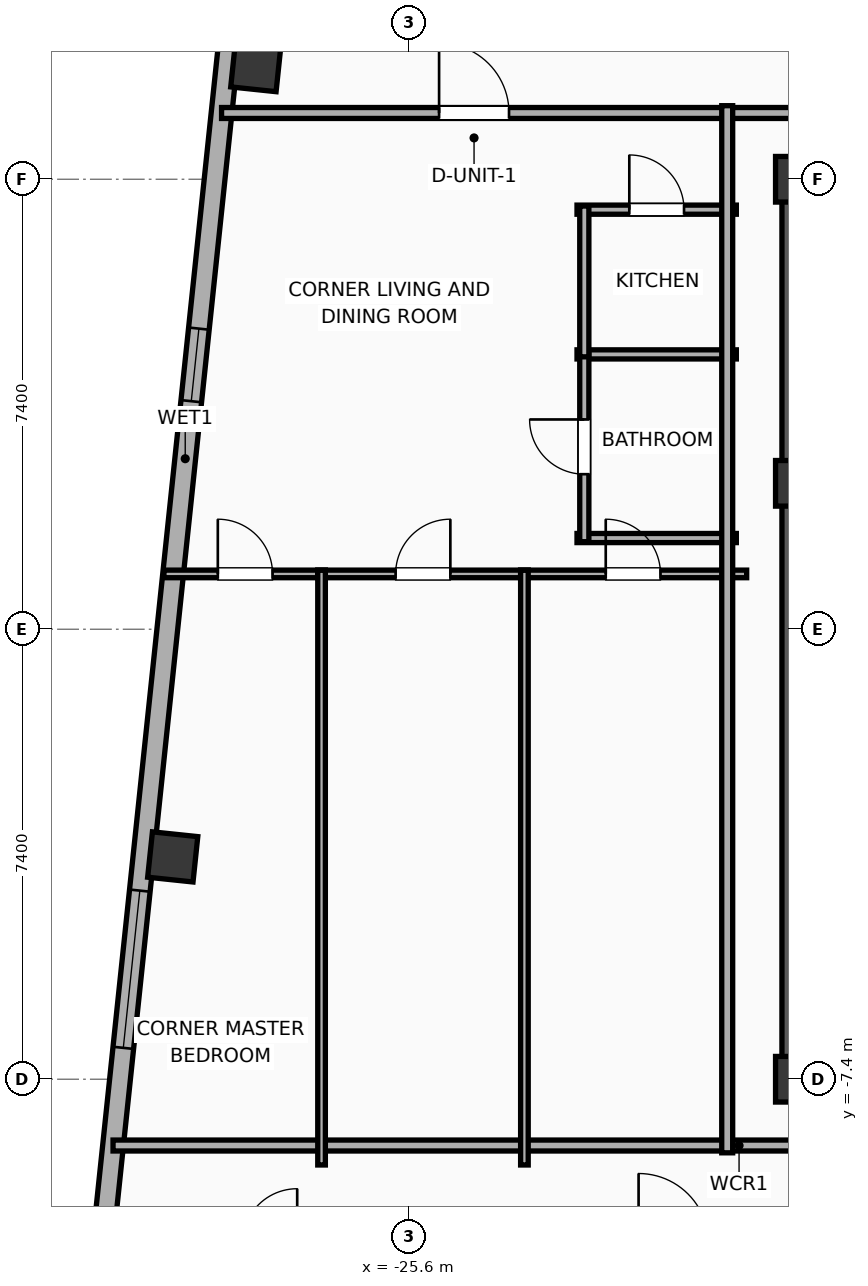
"""IFC4 building model, lengths in metres.
Left out: names, types, materials, properties, quantities, classifications, styles, units other than length and angle.
Written with IfcOpenShell. Run it as: python <this file> out.ifc"""

import sys

from ifc_helpers import new_model, si_unit, direction, frame, frame_2d, origin, origin_2d, place, context, subcontext, project, spatial, rectangle, hollow_rectangle, extrude, element, fill, save


model = new_model("IFC4")
c1 = context("Model", 3, precision=1e-05, world=origin(), true_north=direction((0.0, 1.0)))
c2 = subcontext(c1, "Body", "Model", "MODEL_VIEW")
j1 = project(units=[si_unit("LENGTHUNIT", "METRE"), si_unit("PLANEANGLEUNIT", "RADIAN")], contexts=[c1])
p1 = place(None, origin())
s1 = spatial("IfcSite", under=j1, at=p1, CompositionType="ELEMENT")
p2 = place(p1, origin())
s2 = spatial("IfcBuilding", under=s1, at=p2, CompositionType="ELEMENT")
p3 = place(p2, frame((0.0, 0.0, 299.0)))
s3 = spatial("IfcBuildingStorey", under=s2, at=p3, CompositionType="ELEMENT", Elevation=299.0)
for number, where, z_axis, x_axis in (
    (1, (-19.2, -7.4, 0.0), (0.0, 0.0, 1.0), (1.0, 0.0, 0.0)),
    (2, (-19.2, 2.4, 0.0), (0.0, 0.0, 1.0), (1.0, 0.0, 0.0)),
    (3, (-19.2, 7.4, 0.0), (0.0, 0.0, 1.0), (1.0, 0.0, 0.0)),
):
    element("IfcColumn", number, at=place(p3, frame(where, z_axis=z_axis, x_axis=x_axis)), inside=s3, PredefinedType="COLUMN", context=c2, shape_type="SweptSolid", body=[
        extrude(rectangle(XDim=0.75, YDim=0.75, at=origin_2d()), origin(), (0.0, 0.0, 1.0), 3.9),
    ])
for number, where, z_axis, x_axis in (
    (4, (-19.425, -7.4, 0.0), (0.0, 0.0, 1.0), (1.0, 0.0, 0.0)),
    (5, (-19.425, 7.4, 0.0), (0.0, 0.0, 1.0), (1.0, 0.0, 0.0)),
):
    element("IfcWall", number, at=place(p3, frame(where, z_axis=z_axis, x_axis=x_axis)), inside=s3, PredefinedType="SHEAR", context=c2, shape_type="SweptSolid", body=[
        extrude(rectangle(XDim=7.25, YDim=0.45, at=frame_2d((3.625, 0.0))), origin(), (0.0, 0.0, 1.0), 3.635),
    ])
p4 = place(p3, frame((-19.145, -7.4, 0.0), z_axis=(0.0, 0.0, 1.0), x_axis=(0.0, 1.0, 0.0)))
e6 = element("IfcWall", 6, at=p4, inside=s3, PredefinedType="SHEAR", context=c2, shape_type="SweptSolid", body=[
    extrude(rectangle(XDim=14.8, YDim=0.65, at=frame_2d((7.4, 0.0))), origin(), (0.0, 0.0, 1.0), 3.635),
])
for number, where, z_axis, x_axis in (
    (7, (-28.123, 9.252, 0.0), (0.0, 0.0, 1.0), (0.995, -0.105, 0.0)),
    (8, (-29.489, -3.744, 0.0), (0.0, 0.0, 1.0), (0.995, -0.105, 0.0)),
):
    element("IfcColumn", number, at=place(p3, frame(where, z_axis=z_axis, x_axis=x_axis)), inside=s3, PredefinedType="COLUMN", context=c2, shape_type="SweptSolid", body=[
        extrude(hollow_rectangle(XDim=0.75, YDim=0.75, WallThickness=0.025, at=origin_2d()), origin(), (0.0, 0.0, 1.0), 3.9),
    ])
p5 = place(p3, frame((-30.87, -12.296, 0.0), z_axis=(0.0, 0.0, 1.0), x_axis=(0.104533282919, 0.994521388791, 0.0)))
e9 = element("IfcWall", 9, at=p5, inside=s3, PredefinedType="ELEMENTEDWALL", context=c2, shape_type="SweptSolid", body=[
    extrude(rectangle(XDim=30.366, YDim=0.34, at=frame_2d((15.183, 0.0))), origin(), (0.0, 0.0, 1.0), 3.635),
])
p6 = place(p5, frame((5.442, 0.0, 0.65)))
e10 = element("IfcOpeningElement", 10, at=p6, cuts=e9, PredefinedType="OPENING", context=c2, shape_type="SweptSolid", body=[
    extrude(rectangle(XDim=2.6, YDim=2.45, at=frame_2d((1.3, 1.225))), frame((0.0, 0.18, 0.0), z_axis=(0.0, -1.0, 0.0), x_axis=(1.0, 0.0, 0.0)), (0.0, 0.0, 1.0), 0.36),
])
p7 = place(p5, frame((27.017, 0.0, 0.75)))
e11 = element("IfcOpeningElement", 11, at=p7, cuts=e9, PredefinedType="OPENING", context=c2, shape_type="SweptSolid", body=[
    extrude(rectangle(XDim=1.2, YDim=2.05, at=frame_2d((0.6, 1.025))), frame((0.0, 0.18, 0.0), z_axis=(0.0, -1.0, 0.0), x_axis=(1.0, 0.0, 0.0)), (0.0, 0.0, 1.0), 0.36),
])
p8 = place(p5, frame((16.135, 0.0, 0.75)))
e12 = element("IfcOpeningElement", 12, at=p8, cuts=e9, PredefinedType="OPENING", context=c2, shape_type="SweptSolid", body=[
    extrude(rectangle(XDim=1.2, YDim=2.05, at=frame_2d((0.6, 1.025))), frame((0.0, 0.18, 0.0), z_axis=(0.0, -1.0, 0.0), x_axis=(1.0, 0.0, 0.0)), (0.0, 0.0, 1.0), 0.36),
])
p9 = place(p3, frame((-28.686, 8.49, 0.0), z_axis=(0.0, 0.0, 1.0), x_axis=(1.0, 0.0, 0.0)))
e13 = element("IfcWall", 13, at=p9, inside=s3, PredefinedType="PARTITIONING", context=c2, shape_type="SweptSolid", body=[
    extrude(rectangle(XDim=18.806, YDim=0.18, at=frame_2d((9.403, 0.0))), origin(), (0.0, 0.0, 1.0), 3.075),
])
p10 = place(p9, frame((3.577, 0.0, 0.0)))
e14 = element("IfcOpeningElement", 14, at=p10, cuts=e13, PredefinedType="OPENING", context=c2, shape_type="SweptSolid", body=[
    extrude(rectangle(XDim=1.15, YDim=2.05, at=frame_2d((0.575, 1.025))), frame((0.0, 0.1, 0.0), z_axis=(0.0, -1.0, 0.0), x_axis=(1.0, 0.0, 0.0)), (0.0, 0.0, 1.0), 0.2),
])
p11 = place(p3, frame((-30.47, -8.49, 0.0), z_axis=(0.0, 0.0, 1.0), x_axis=(1.0, 0.0, 0.0)))
e15 = element("IfcWall", 15, at=p11, inside=s3, PredefinedType="PARTITIONING", context=c2, shape_type="SweptSolid", body=[
    extrude(rectangle(XDim=20.59, YDim=0.18, at=frame_2d((10.295, 0.0))), origin(), (0.0, 0.0, 1.0), 3.635),
])
p12 = place(p3, frame((-22.84, 6.9, 0.0), z_axis=(0.0, 0.0, 1.0), x_axis=(1.0, 0.0, 0.0)))
e16 = element("IfcWall", 16, at=p12, inside=s3, PredefinedType="PLUMBINGWALL", context=c2, shape_type="SweptSolid", body=[
    extrude(rectangle(XDim=2.62, YDim=0.15, at=frame_2d((1.31, 0.0))), origin(), (0.0, 0.0, 1.0), 3.635),
])
p13 = place(p12, frame((0.86, 0.0, 0.0)))
e17 = element("IfcOpeningElement", 17, at=p13, cuts=e16, PredefinedType="OPENING", context=c2, shape_type="SweptSolid", body=[
    extrude(rectangle(XDim=0.9, YDim=2.05, at=frame_2d((0.45, 1.025))), frame((0.0, 0.085, 0.0), z_axis=(0.0, -1.0, 0.0), x_axis=(1.0, 0.0, 0.0)), (0.0, 0.0, 1.0), 0.17),
])
for number, where, z_axis, x_axis in (
    (18, (-22.84, 4.52, 0.0), (0.0, 0.0, 1.0), (1.0, 0.0, 0.0)),
    (19, (-22.84, 1.5, 0.0), (0.0, 0.0, 1.0), (1.0, 0.0, 0.0)),
):
    element("IfcWall", number, at=place(p3, frame(where, z_axis=z_axis, x_axis=x_axis)), inside=s3, PredefinedType="PLUMBINGWALL", context=c2, shape_type="SweptSolid", body=[
        extrude(rectangle(XDim=2.62, YDim=0.15, at=frame_2d((1.31, 0.0))), origin(), (0.0, 0.0, 1.0), 3.635),
    ])
p14 = place(p3, frame((-22.72, 1.44, 0.0), z_axis=(0.0, 0.0, 1.0), x_axis=(0.0, 1.0, 0.0)))
e20 = element("IfcWall", 20, at=p14, inside=s3, PredefinedType="PLUMBINGWALL", context=c2, shape_type="SweptSolid", body=[
    extrude(rectangle(XDim=3.12, YDim=0.15, at=frame_2d((1.56, 0.0))), origin(), (0.0, 0.0, 1.0), 3.635),
])
p15 = place(p14, frame((1.11, 0.0, 0.0)))
e21 = element("IfcOpeningElement", 21, at=p15, cuts=e20, PredefinedType="OPENING", context=c2, shape_type="SweptSolid", body=[
    extrude(rectangle(XDim=0.9, YDim=2.05, at=frame_2d((0.45, 1.025))), frame((0.0, 0.085, 0.0), z_axis=(0.0, -1.0, 0.0), x_axis=(1.0, 0.0, 0.0)), (0.0, 0.0, 1.0), 0.17),
])
p16 = place(p3, frame((-22.72, 4.48, 0.0), z_axis=(0.0, 0.0, 1.0), x_axis=(0.0, 1.0, 0.0)))
e22 = element("IfcWall", 22, at=p16, inside=s3, PredefinedType="PLUMBINGWALL", context=c2, shape_type="SweptSolid", body=[
    extrude(rectangle(XDim=2.48, YDim=0.15, at=frame_2d((1.24, 0.0))), origin(), (0.0, 0.0, 1.0), 3.635),
])
p17 = place(p3, frame((-29.633, 0.91, 0.0), z_axis=(0.0, 0.0, 1.0), x_axis=(1.0, 0.0, 0.0)))
e23 = element("IfcWall", 23, at=p17, inside=s3, PredefinedType="PARTITIONING", context=c2, shape_type="SweptSolid", body=[
    extrude(rectangle(XDim=2.655, YDim=0.125, at=frame_2d((1.327, 0.0))), origin(), (0.0, 0.0, 1.0), 3.635),
])
p18 = place(p17, frame((0.886, 0.0, 0.0)))
e24 = element("IfcOpeningElement", 24, at=p18, cuts=e23, PredefinedType="OPENING", context=c2, shape_type="SweptSolid", body=[
    extrude(rectangle(XDim=0.9, YDim=2.05, at=frame_2d((0.45, 1.025))), frame((0.0, 0.073, 0.0), z_axis=(0.0, -1.0, 0.0), x_axis=(1.0, 0.0, 0.0)), (0.0, 0.0, 1.0), 0.145),
])
p19 = place(p3, frame((-27.104, 0.91, 0.0), z_axis=(0.0, 0.0, 1.0), x_axis=(1.0, 0.0, 0.0)))
e25 = element("IfcWall", 25, at=p19, inside=s3, PredefinedType="PARTITIONING", context=c2, shape_type="SweptSolid", body=[
    extrude(rectangle(XDim=3.461, YDim=0.125, at=frame_2d((1.73, 0.0))), origin(), (0.0, 0.0, 1.0), 3.635),
])
p20 = place(p19, frame((1.281, 0.0, 0.0)))
e26 = element("IfcOpeningElement", 26, at=p20, cuts=e25, PredefinedType="OPENING", context=c2, shape_type="SweptSolid", body=[
    extrude(rectangle(XDim=0.9, YDim=2.05, at=frame_2d((0.45, 1.025))), frame((0.0, 0.073, 0.0), z_axis=(0.0, -1.0, 0.0), x_axis=(1.0, 0.0, 0.0)), (0.0, 0.0, 1.0), 0.145),
])
p21 = place(p3, frame((-23.768, 0.91, 0.0), z_axis=(0.0, 0.0, 1.0), x_axis=(1.0, 0.0, 0.0)))
e27 = element("IfcWall", 27, at=p21, inside=s3, PredefinedType="PARTITIONING", context=c2, shape_type="SweptSolid", body=[
    extrude(rectangle(XDim=3.718, YDim=0.125, at=frame_2d((1.859, 0.0))), origin(), (0.0, 0.0, 1.0), 3.635),
])
p22 = place(p21, frame((1.4, 0.0, 0.0)))
e28 = element("IfcOpeningElement", 28, at=p22, cuts=e27, PredefinedType="OPENING", context=c2, shape_type="SweptSolid", body=[
    extrude(rectangle(XDim=0.9, YDim=2.05, at=frame_2d((0.45, 1.025))), frame((0.0, 0.073, 0.0), z_axis=(0.0, -1.0, 0.0), x_axis=(1.0, 0.0, 0.0)), (0.0, 0.0, 1.0), 0.145),
])
for number, where, z_axis, x_axis in (
    (29, (-23.705, -8.81, 0.0), (0.0, 0.0, 1.0), (0.0, 1.0, 0.0)),
    (30, (-27.041, -8.81, 0.0), (0.0, 0.0, 1.0), (0.0, 1.0, 0.0)),
):
    element("IfcWall", number, at=place(p3, frame(where, z_axis=z_axis, x_axis=x_axis)), inside=s3, PredefinedType="PARTITIONING", context=c2, shape_type="SweptSolid", body=[
        extrude(rectangle(XDim=9.78, YDim=0.125, at=frame_2d((4.89, 0.0))), origin(), (0.0, 0.0, 1.0), 3.635),
    ])
p23 = place(p3, frame((-20.37, -8.61, 0.0), z_axis=(0.0, 0.0, 1.0), x_axis=(0.0, 1.0, 0.0)))
e31 = element("IfcWall", 31, at=p23, inside=s3, PredefinedType="PARTITIONING", context=c2, shape_type="SweptSolid", body=[
    extrude(rectangle(XDim=17.22, YDim=0.18, at=frame_2d((8.61, 0.0))), origin(), (0.0, 0.0, 1.0), 3.635),
])
p24 = place(p6, origin())
e32 = element("IfcWindow", 32, at=p24, inside=s3, PartitioningType="SINGLE_PANEL", PredefinedType="WINDOW", context=c2, shape_type="SweptSolid", body=[
    extrude(rectangle(XDim=2.6, YDim=2.45, at=frame_2d((1.3, 1.225))), frame((0.0, 0.03, 0.0), z_axis=(0.0, -1.0, 0.0), x_axis=(1.0, 0.0, 0.0)), (0.0, 0.0, 1.0), 0.06),
])
fill(e10, e32)
p25 = place(p8, origin())
e33 = element("IfcWindow", 33, at=p25, inside=s3, PartitioningType="SINGLE_PANEL", PredefinedType="WINDOW", context=c2, shape_type="SweptSolid", body=[
    extrude(rectangle(XDim=1.2, YDim=2.05, at=frame_2d((0.6, 1.025))), frame((0.0, 0.03, 0.0), z_axis=(0.0, -1.0, 0.0), x_axis=(1.0, 0.0, 0.0)), (0.0, 0.0, 1.0), 0.06),
])
fill(e12, e33)
p26 = place(p10, origin())
e34 = element("IfcDoor", 34, at=p26, inside=s3, OperationType="SINGLE_SWING_LEFT", PredefinedType="DOOR", context=c2, shape_type="SweptSolid", body=[
    extrude(rectangle(XDim=1.15, YDim=2.05, at=frame_2d((0.575, 1.025))), frame((0.0, 0.025, 0.0), z_axis=(0.0, -1.0, 0.0), x_axis=(1.0, 0.0, 0.0)), (0.0, 0.0, 1.0), 0.05),
])
fill(e14, e34)
p27 = place(p13, origin())
e35 = element("IfcDoor", 35, at=p27, inside=s3, OperationType="SINGLE_SWING_LEFT", PredefinedType="DOOR", context=c2, shape_type="SweptSolid", body=[
    extrude(rectangle(XDim=0.9, YDim=2.05, at=frame_2d((0.45, 1.025))), frame((0.0, 0.025, 0.0), z_axis=(0.0, -1.0, 0.0), x_axis=(1.0, 0.0, 0.0)), (0.0, 0.0, 1.0), 0.05),
])
fill(e17, e35)
p28 = place(p15, origin())
e36 = element("IfcDoor", 36, at=p28, inside=s3, OperationType="SINGLE_SWING_RIGHT", PredefinedType="DOOR", context=c2, shape_type="SweptSolid", body=[
    extrude(rectangle(XDim=0.9, YDim=2.05, at=frame_2d((0.45, 1.025))), frame((0.0, 0.025, 0.0), z_axis=(0.0, -1.0, 0.0), x_axis=(1.0, 0.0, 0.0)), (0.0, 0.0, 1.0), 0.05),
])
fill(e21, e36)
p29 = place(p18, origin())
e37 = element("IfcDoor", 37, at=p29, inside=s3, OperationType="SINGLE_SWING_LEFT", PredefinedType="DOOR", context=c2, shape_type="SweptSolid", body=[
    extrude(rectangle(XDim=0.9, YDim=2.05, at=frame_2d((0.45, 1.025))), frame((0.0, 0.025, 0.0), z_axis=(0.0, -1.0, 0.0), x_axis=(1.0, 0.0, 0.0)), (0.0, 0.0, 1.0), 0.05),
])
fill(e24, e37)
p30 = place(p20, origin())
e38 = element("IfcDoor", 38, at=p30, inside=s3, OperationType="SINGLE_SWING_RIGHT", PredefinedType="DOOR", context=c2, shape_type="SweptSolid", body=[
    extrude(rectangle(XDim=0.9, YDim=2.05, at=frame_2d((0.45, 1.025))), frame((0.0, 0.025, 0.0), z_axis=(0.0, -1.0, 0.0), x_axis=(1.0, 0.0, 0.0)), (0.0, 0.0, 1.0), 0.05),
])
fill(e26, e38)
p31 = place(p22, origin())
e39 = element("IfcDoor", 39, at=p31, inside=s3, OperationType="SINGLE_SWING_LEFT", PredefinedType="DOOR", context=c2, shape_type="SweptSolid", body=[
    extrude(rectangle(XDim=0.9, YDim=2.05, at=frame_2d((0.45, 1.025))), frame((0.0, 0.025, 0.0), z_axis=(0.0, -1.0, 0.0), x_axis=(1.0, 0.0, 0.0)), (0.0, 0.0, 1.0), 0.05),
])
fill(e28, e39)
save(model, sys.argv[1])
